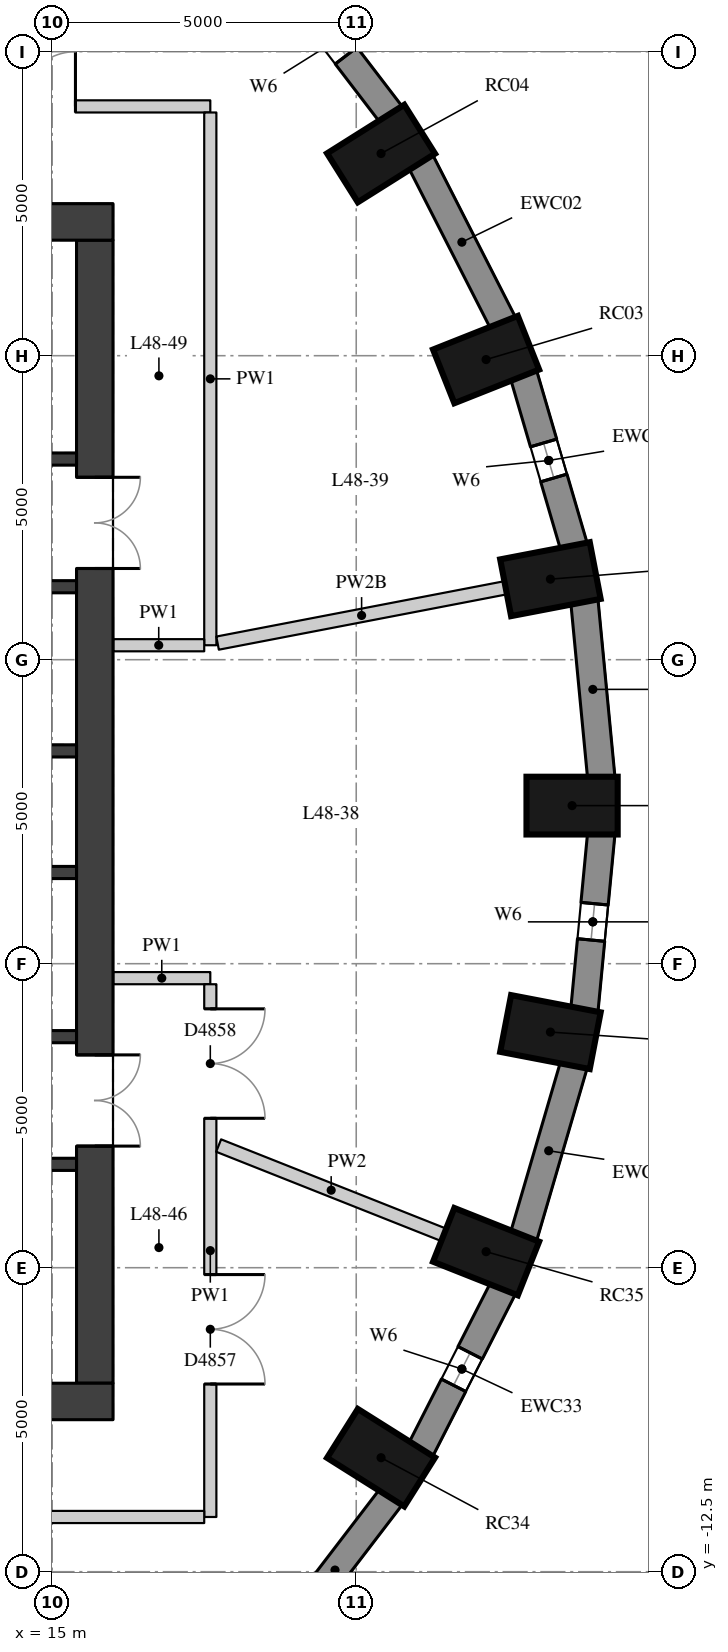
"""IFC4 building model, lengths in metres.
Left out: names, types, materials, properties, quantities, classifications, styles, units other than length and angle.
Written with IfcOpenShell. Run it as: python <this file> out.ifc"""

import sys

from ifc_helpers import new_model, si_unit, direction, frame, frame_2d, origin, origin_2d, place, context, subcontext, project, spatial, rectangle, extrude, element, fill, save


model = new_model("IFC4")
c1 = context("Model", 3, precision=1e-05, world=origin(), true_north=direction((0.0, 1.0)))
c2 = subcontext(c1, "Body", "Model", "MODEL_VIEW")
j1 = project(units=[si_unit("LENGTHUNIT", "METRE"), si_unit("PLANEANGLEUNIT", "RADIAN")], contexts=[c1])
p1 = place(None, origin())
s1 = spatial("IfcSite", under=j1, at=p1, CompositionType="ELEMENT")
p2 = place(p1, origin())
s2 = spatial("IfcBuilding", under=s1, at=p2, CompositionType="ELEMENT")
p3 = place(p2, frame((0.0, 0.0, 171.5)))
s3 = spatial("IfcBuildingStorey", under=s2, at=p3, CompositionType="ELEMENT", Elevation=171.5)
for number, where, z_axis, x_axis in (
    (1, (23.55, 0.1, 0.0), (0.0, 0.0, 1.0), (1.0, 0.0, 0.0)),
    (2, (23.194, 3.825, 0.0), (0.0, 0.0, 1.0), (0.982, 0.189, 0.0)),
    (3, (22.136, 7.436, 0.0), (0.0, 0.0, 1.0), (0.93, 0.369, 0.0)),
    (4, (20.408, 10.825, 0.0), (0.0, 0.0, 1.0), (0.846, 0.533, 0.0)),
    (5, (20.408, -10.625, 0.0), (0.0, 0.0, 1.0), (0.846, -0.533, 0.0)),
    (6, (22.136, -7.236, 0.0), (0.0, 0.0, 1.0), (0.93, -0.369, 0.0)),
    (7, (23.194, -3.625, 0.0), (0.0, 0.0, 1.0), (0.982, -0.189, 0.0)),
):
    element("IfcColumn", number, at=place(p3, frame(where, z_axis=z_axis, x_axis=x_axis)), inside=s3, PredefinedType="COLUMN", context=c2, shape_type="SweptSolid", body=[
        extrude(rectangle(XDim=1.5, YDim=0.95, at=origin_2d()), origin(), (0.0, 0.0, 1.0), 3.3),
    ])
p4 = place(p3, frame((24.031, 0.555, 0.0), z_axis=(0.0, 0.0, 1.0), x_axis=(-0.095265737322, 0.995451876935, 0.0)))
e8 = element("IfcWall", 8, at=p4, inside=s3, PredefinedType="SOLIDWALL", context=c2, shape_type="SweptSolid", body=[
    extrude(rectangle(XDim=2.927, YDim=0.45, at=frame_2d((1.463, 0.0))), origin(), (0.0, 0.0, 1.0), 3.02),
])
p5 = place(p3, frame((23.58, 4.362, 0.0), z_axis=(0.0, 0.0, 1.0), x_axis=(-0.281049481624, 0.959693278542, 0.0)))
e9 = element("IfcWall", 9, at=p5, inside=s3, PredefinedType="SOLIDWALL", context=c2, shape_type="SweptSolid", body=[
    extrude(rectangle(XDim=2.948, YDim=0.45, at=frame_2d((1.474, 0.0))), origin(), (0.0, 0.0, 1.0), 3.02),
])
p6 = place(p5, frame((1.174, 0.0, 0.4)))
e10 = element("IfcOpeningElement", 10, at=p6, cuts=e9, PredefinedType="OPENING", context=c2, shape_type="SweptSolid", body=[
    extrude(rectangle(XDim=0.6, YDim=1.75, at=frame_2d((0.3, 0.875))), frame((0.0, 0.235, 0.0), z_axis=(0.0, -1.0, 0.0), x_axis=(1.0, 0.0, 0.0)), (0.0, 0.0, 1.0), 0.47),
])
p7 = place(p3, frame((22.415, 8.037, 0.0), z_axis=(0.0, 0.0, 1.0), x_axis=(-0.454133999889, 0.890933392653, 0.0)))
e11 = element("IfcWall", 11, at=p7, inside=s3, PredefinedType="SOLIDWALL", context=c2, shape_type="SweptSolid", body=[
    extrude(rectangle(XDim=2.986, YDim=0.45, at=frame_2d((1.493, 0.0))), origin(), (0.0, 0.0, 1.0), 3.02),
])
p8 = place(p3, frame((20.574, 11.467, 0.0), z_axis=(0.0, 0.0, 1.0), x_axis=(-0.607817056371, 0.794077090706, 0.0)))
e12 = element("IfcWall", 12, at=p8, inside=s3, PredefinedType="SOLIDWALL", context=c2, shape_type="SweptSolid", body=[
    extrude(rectangle(XDim=3.037, YDim=0.45, at=frame_2d((1.519, 0.0))), origin(), (0.0, 0.0, 1.0), 3.02),
])
p9 = place(p8, frame((1.219, 0.0, 0.4)))
e13 = element("IfcOpeningElement", 13, at=p9, cuts=e12, PredefinedType="OPENING", context=c2, shape_type="SweptSolid", body=[
    extrude(rectangle(XDim=0.6, YDim=1.75, at=frame_2d((0.3, 0.875))), frame((0.0, 0.235, 0.0), z_axis=(0.0, -1.0, 0.0), x_axis=(1.0, 0.0, 0.0)), (0.0, 0.0, 1.0), 0.47),
])
p10 = place(p3, frame((18.728, -13.679, 0.0), z_axis=(0.0, 0.0, 1.0), x_axis=(0.607817056371, 0.794077090706, 0.0)))
e14 = element("IfcWall", 14, at=p10, inside=s3, PredefinedType="SOLIDWALL", context=c2, shape_type="SweptSolid", body=[
    extrude(rectangle(XDim=3.037, YDim=0.45, at=frame_2d((1.519, 0.0))), origin(), (0.0, 0.0, 1.0), 3.02),
])
p11 = place(p3, frame((21.059, -10.497, 0.0), z_axis=(0.0, 0.0, 1.0), x_axis=(0.454133999889, 0.890933392653, 0.0)))
e15 = element("IfcWall", 15, at=p11, inside=s3, PredefinedType="SOLIDWALL", context=c2, shape_type="SweptSolid", body=[
    extrude(rectangle(XDim=2.986, YDim=0.45, at=frame_2d((1.493, 0.0))), origin(), (0.0, 0.0, 1.0), 3.02),
])
p12 = place(p11, frame((1.193, 0.0, 0.4)))
e16 = element("IfcOpeningElement", 16, at=p12, cuts=e15, PredefinedType="OPENING", context=c2, shape_type="SweptSolid", body=[
    extrude(rectangle(XDim=0.6, YDim=1.75, at=frame_2d((0.3, 0.875))), frame((0.0, 0.235, 0.0), z_axis=(0.0, -1.0, 0.0), x_axis=(1.0, 0.0, 0.0)), (0.0, 0.0, 1.0), 0.47),
])
p13 = place(p3, frame((22.751, -6.991, 0.0), z_axis=(0.0, 0.0, 1.0), x_axis=(0.281049481624, 0.959693278542, 0.0)))
e17 = element("IfcWall", 17, at=p13, inside=s3, PredefinedType="SOLIDWALL", context=c2, shape_type="SweptSolid", body=[
    extrude(rectangle(XDim=2.948, YDim=0.45, at=frame_2d((1.474, 0.0))), origin(), (0.0, 0.0, 1.0), 3.02),
])
p14 = place(p3, frame((23.752, -3.269, 0.0), z_axis=(0.0, 0.0, 1.0), x_axis=(0.095257827044, 0.995452633924, 0.0)))
e18 = element("IfcWall", 18, at=p14, inside=s3, PredefinedType="SOLIDWALL", context=c2, shape_type="SweptSolid", body=[
    extrude(rectangle(XDim=2.927, YDim=0.45, at=frame_2d((1.463, 0.0))), origin(), (0.0, 0.0, 1.0), 3.02),
])
p15 = place(p14, frame((1.163, 0.0, 0.4)))
e19 = element("IfcOpeningElement", 19, at=p15, cuts=e18, PredefinedType="OPENING", context=c2, shape_type="SweptSolid", body=[
    extrude(rectangle(XDim=0.6, YDim=1.75, at=frame_2d((0.3, 0.875))), frame((0.0, 0.235, 0.0), z_axis=(0.0, -1.0, 0.0), x_axis=(1.0, 0.0, 0.0)), (0.0, 0.0, 1.0), 0.47),
])
p16 = place(p3, frame((15.7, -9.4, 0.0), z_axis=(0.0, 0.0, 1.0), x_axis=(0.0, 1.0, 0.0)))
e20 = element("IfcWall", 20, at=p16, inside=s3, PredefinedType="SHEAR", context=c2, shape_type="SweptSolid", body=[
    extrude(rectangle(XDim=18.8, YDim=0.6, at=frame_2d((9.4, 0.0))), origin(), (0.0, 0.0, 1.0), 3.02),
])
p17 = place(p16, frame((13.4, 0.0, 0.0)))
e21 = element("IfcOpeningElement", 21, at=p17, cuts=e20, PredefinedType="OPENING", context=c2, shape_type="SweptSolid", body=[
    extrude(rectangle(XDim=1.5, YDim=2.1, at=frame_2d((0.75, 1.05))), frame((0.0, 0.31, 0.0), z_axis=(0.0, -1.0, 0.0), x_axis=(1.0, 0.0, 0.0)), (0.0, 0.0, 1.0), 0.62),
])
p18 = place(p16, frame((3.9, 0.0, 0.0)))
e22 = element("IfcOpeningElement", 22, at=p18, cuts=e20, PredefinedType="OPENING", context=c2, shape_type="SweptSolid", body=[
    extrude(rectangle(XDim=1.5, YDim=2.1, at=frame_2d((0.75, 1.05))), frame((0.0, 0.31, 0.0), z_axis=(0.0, -1.0, 0.0), x_axis=(1.0, 0.0, 0.0)), (0.0, 0.0, 1.0), 0.62),
])
for number, where, z_axis, x_axis in (
    (23, (4.0, 9.7, 0.0), (0.0, 0.0, 1.0), (1.0, 0.0, 0.0)),
    (24, (4.0, -9.7, 0.0), (0.0, 0.0, 1.0), (1.0, 0.0, 0.0)),
):
    element("IfcWall", number, at=place(p3, frame(where, z_axis=z_axis, x_axis=x_axis)), inside=s3, PredefinedType="SHEAR", context=c2, shape_type="SweptSolid", body=[
        extrude(rectangle(XDim=12.0, YDim=0.6, at=frame_2d((6.0, 0.0))), origin(), (0.0, 0.0, 1.0), 3.02),
    ])
p19 = place(p3, frame((4.6, 5.8, 0.0), z_axis=(0.0, 0.0, 1.0), x_axis=(1.0, 0.0, 0.0)))
e25 = element("IfcWall", 25, at=p19, inside=s3, PredefinedType="SHEAR", context=c2, shape_type="SweptSolid", body=[
    extrude(rectangle(XDim=10.8, YDim=0.2, at=frame_2d((5.4, 0.0))), origin(), (0.0, 0.0, 1.0), 3.02),
])
p20 = place(p19, frame((7.05, 0.0, 0.0)))
e26 = element("IfcOpeningElement", 26, at=p20, cuts=e25, PredefinedType="OPENING", context=c2, shape_type="SweptSolid", body=[
    extrude(rectangle(XDim=1.1, YDim=2.1, at=frame_2d((0.55, 1.05))), frame((0.0, 0.11, 0.0), z_axis=(0.0, -1.0, 0.0), x_axis=(1.0, 0.0, 0.0)), (0.0, 0.0, 1.0), 0.22),
])
p21 = place(p19, frame((9.05, 0.0, 0.0)))
e27 = element("IfcOpeningElement", 27, at=p21, cuts=e25, PredefinedType="OPENING", context=c2, shape_type="SweptSolid", body=[
    extrude(rectangle(XDim=1.1, YDim=2.1, at=frame_2d((0.55, 1.05))), frame((0.0, 0.11, 0.0), z_axis=(0.0, -1.0, 0.0), x_axis=(1.0, 0.0, 0.0)), (0.0, 0.0, 1.0), 0.22),
])
p22 = place(p3, frame((4.6, 3.7, 0.0), z_axis=(0.0, 0.0, 1.0), x_axis=(1.0, 0.0, 0.0)))
e28 = element("IfcWall", 28, at=p22, inside=s3, PredefinedType="SHEAR", context=c2, shape_type="SweptSolid", body=[
    extrude(rectangle(XDim=10.8, YDim=0.2, at=frame_2d((5.4, 0.0))), origin(), (0.0, 0.0, 1.0), 3.02),
])
p23 = place(p22, frame((6.6, 0.0, 0.0)))
e29 = element("IfcOpeningElement", 29, at=p23, cuts=e28, PredefinedType="OPENING", context=c2, shape_type="SweptSolid", body=[
    extrude(rectangle(XDim=1.1, YDim=2.1, at=frame_2d((0.55, 1.05))), frame((0.0, 0.11, 0.0), z_axis=(0.0, -1.0, 0.0), x_axis=(1.0, 0.0, 0.0)), (0.0, 0.0, 1.0), 0.22),
])
p24 = place(p22, frame((8.9, 0.0, 0.0)))
e30 = element("IfcOpeningElement", 30, at=p24, cuts=e28, PredefinedType="OPENING", context=c2, shape_type="SweptSolid", body=[
    extrude(rectangle(XDim=1.1, YDim=2.1, at=frame_2d((0.55, 1.05))), frame((0.0, 0.11, 0.0), z_axis=(0.0, -1.0, 0.0), x_axis=(1.0, 0.0, 0.0)), (0.0, 0.0, 1.0), 0.22),
])
for number, where, z_axis, x_axis in (
    (31, (4.6, 1.0, 0.0), (0.0, 0.0, 1.0), (1.0, 0.0, 0.0)),
    (32, (4.6, -1.0, 0.0), (0.0, 0.0, 1.0), (1.0, 0.0, 0.0)),
):
    element("IfcWall", number, at=place(p3, frame(where, z_axis=z_axis, x_axis=x_axis)), inside=s3, PredefinedType="SHEAR", context=c2, shape_type="SweptSolid", body=[
        extrude(rectangle(XDim=10.8, YDim=0.2, at=frame_2d((5.4, 0.0))), origin(), (0.0, 0.0, 1.0), 3.02),
    ])
p25 = place(p3, frame((4.6, -3.7, 0.0), z_axis=(0.0, 0.0, 1.0), x_axis=(1.0, 0.0, 0.0)))
e33 = element("IfcWall", 33, at=p25, inside=s3, PredefinedType="SHEAR", context=c2, shape_type="SweptSolid", body=[
    extrude(rectangle(XDim=10.8, YDim=0.2, at=frame_2d((5.4, 0.0))), origin(), (0.0, 0.0, 1.0), 3.02),
])
p26 = place(p25, frame((6.6, 0.0, 0.0)))
e34 = element("IfcOpeningElement", 34, at=p26, cuts=e33, PredefinedType="OPENING", context=c2, shape_type="SweptSolid", body=[
    extrude(rectangle(XDim=1.1, YDim=2.1, at=frame_2d((0.55, 1.05))), frame((0.0, 0.11, 0.0), z_axis=(0.0, -1.0, 0.0), x_axis=(1.0, 0.0, 0.0)), (0.0, 0.0, 1.0), 0.22),
])
p27 = place(p25, frame((8.9, 0.0, 0.0)))
e35 = element("IfcOpeningElement", 35, at=p27, cuts=e33, PredefinedType="OPENING", context=c2, shape_type="SweptSolid", body=[
    extrude(rectangle(XDim=1.1, YDim=2.1, at=frame_2d((0.55, 1.05))), frame((0.0, 0.11, 0.0), z_axis=(0.0, -1.0, 0.0), x_axis=(1.0, 0.0, 0.0)), (0.0, 0.0, 1.0), 0.22),
])
p28 = place(p3, frame((4.6, -5.8, 0.0), z_axis=(0.0, 0.0, 1.0), x_axis=(1.0, 0.0, 0.0)))
e36 = element("IfcWall", 36, at=p28, inside=s3, PredefinedType="SHEAR", context=c2, shape_type="SweptSolid", body=[
    extrude(rectangle(XDim=10.8, YDim=0.2, at=frame_2d((5.4, 0.0))), origin(), (0.0, 0.0, 1.0), 3.02),
])
p29 = place(p3, frame((8.817, 11.6, 0.0), z_axis=(0.0, 0.0, 1.0), x_axis=(1.0, 0.0, 0.0)))
e37 = element("IfcWall", 37, at=p29, inside=s3, PredefinedType="PARTITIONING", context=c2, shape_type="SweptSolid", body=[
    extrude(rectangle(XDim=8.783, YDim=0.2, at=frame_2d((4.392, 0.0))), origin(), (0.0, 0.0, 1.0), 3.02),
])
p30 = place(p29, frame((0.14, 0.0, 0.0)))
e38 = element("IfcOpeningElement", 38, at=p30, cuts=e37, PredefinedType="OPENING", context=c2, shape_type="SweptSolid", body=[
    extrude(rectangle(XDim=1.1, YDim=2.1, at=frame_2d((0.55, 1.05))), frame((0.0, 0.11, 0.0), z_axis=(0.0, -1.0, 0.0), x_axis=(1.0, 0.0, 0.0)), (0.0, 0.0, 1.0), 0.22),
])
p31 = place(p29, frame((4.766, 0.0, 0.0)))
e39 = element("IfcOpeningElement", 39, at=p31, cuts=e37, PredefinedType="OPENING", context=c2, shape_type="SweptSolid", body=[
    extrude(rectangle(XDim=1.8, YDim=2.1, at=frame_2d((0.9, 1.05))), frame((0.0, 0.11, 0.0), z_axis=(0.0, -1.0, 0.0), x_axis=(1.0, 0.0, 0.0)), (0.0, 0.0, 1.0), 0.22),
])
p32 = place(p3, frame((17.6, 11.5, 0.0), z_axis=(0.0, 0.0, 1.0), x_axis=(0.0, -1.0, 0.0)))
e40 = element("IfcWall", 40, at=p32, inside=s3, PredefinedType="PARTITIONING", context=c2, shape_type="SweptSolid", body=[
    extrude(rectangle(XDim=8.762, YDim=0.2, at=frame_2d((4.381, 0.0))), origin(), (0.0, 0.0, 1.0), 3.02),
])
p33 = place(p3, frame((17.5, 2.738, 0.0), z_axis=(0.0, 0.0, 1.0), x_axis=(-1.0, 0.0, 0.0)))
e41 = element("IfcWall", 41, at=p33, inside=s3, PredefinedType="PARTITIONING", context=c2, shape_type="SweptSolid", body=[
    extrude(rectangle(XDim=1.496, YDim=0.2, at=frame_2d((0.748, 0.0))), origin(), (0.0, 0.0, 1.0), 3.02),
])
p34 = place(p3, frame((16.004, -2.738, 0.0), z_axis=(0.0, 0.0, 1.0), x_axis=(1.0, 0.0, 0.0)))
e42 = element("IfcWall", 42, at=p34, inside=s3, PredefinedType="PARTITIONING", context=c2, shape_type="SweptSolid", body=[
    extrude(rectangle(XDim=1.596, YDim=0.2, at=frame_2d((0.798, 0.0))), origin(), (0.0, 0.0, 1.0), 3.02),
])
p35 = place(p3, frame((17.6, -2.838, 0.0), z_axis=(0.0, 0.0, 1.0), x_axis=(0.0, -1.0, 0.0)))
e43 = element("IfcWall", 43, at=p35, inside=s3, PredefinedType="PARTITIONING", context=c2, shape_type="SweptSolid", body=[
    extrude(rectangle(XDim=8.762, YDim=0.2, at=frame_2d((4.381, 0.0))), origin(), (0.0, 0.0, 1.0), 3.02),
])
p36 = place(p35, frame((4.775, 0.0, 0.0)))
e44 = element("IfcOpeningElement", 44, at=p36, cuts=e43, PredefinedType="OPENING", context=c2, shape_type="SweptSolid", body=[
    extrude(rectangle(XDim=1.8, YDim=2.1, at=frame_2d((0.9, 1.05))), frame((0.0, 0.11, 0.0), z_axis=(0.0, -1.0, 0.0), x_axis=(1.0, 0.0, 0.0)), (0.0, 0.0, 1.0), 0.22),
])
p37 = place(p35, frame((0.405, 0.0, 0.0)))
e45 = element("IfcOpeningElement", 45, at=p37, cuts=e43, PredefinedType="OPENING", context=c2, shape_type="SweptSolid", body=[
    extrude(rectangle(XDim=1.8, YDim=2.1, at=frame_2d((0.9, 1.05))), frame((0.0, 0.11, 0.0), z_axis=(0.0, -1.0, 0.0), x_axis=(1.0, 0.0, 0.0)), (0.0, 0.0, 1.0), 0.22),
])
p38 = place(p3, frame((17.5, -11.6, 0.0), z_axis=(0.0, 0.0, 1.0), x_axis=(-1.0, 0.0, 0.0)))
e46 = element("IfcWall", 46, at=p38, inside=s3, PredefinedType="PARTITIONING", context=c2, shape_type="SweptSolid", body=[
    extrude(rectangle(XDim=9.647, YDim=0.2, at=frame_2d((4.823, 0.0))), origin(), (0.0, 0.0, 1.0), 3.02),
])
p39 = place(p38, frame((7.192, 0.0, 0.0)))
e47 = element("IfcOpeningElement", 47, at=p39, cuts=e46, PredefinedType="OPENING", context=c2, shape_type="SweptSolid", body=[
    extrude(rectangle(XDim=0.9, YDim=2.1, at=frame_2d((0.45, 1.05))), frame((0.0, 0.11, 0.0), z_axis=(0.0, -1.0, 0.0), x_axis=(1.0, 0.0, 0.0)), (0.0, 0.0, 1.0), 0.22),
])
p40 = place(p3, frame((22.457, 3.683, 0.0), z_axis=(0.0, 0.0, 1.0), x_axis=(-0.982022686577, -0.188762928159, 0.0)))
e48 = element("IfcWall", 48, at=p40, inside=s3, PredefinedType="PARTITIONING", context=c2, shape_type="SweptSolid", body=[
    extrude(rectangle(XDim=4.824, YDim=0.22, at=frame_2d((2.412, 0.0))), origin(), (0.0, 0.0, 1.0), 2.57),
])
p41 = place(p3, frame((21.439, -6.96, 0.0), z_axis=(0.0, 0.0, 1.0), x_axis=(-0.929517399972, 0.368778257426, 0.0)))
e49 = element("IfcWall", 49, at=p41, inside=s3, PredefinedType="PARTITIONING", context=c2, shape_type="SweptSolid", body=[
    extrude(rectangle(XDim=3.982, YDim=0.22, at=frame_2d((1.991, 0.0))), origin(), (0.0, 0.0, 1.0), 3.02),
])
p42 = place(p6, origin())
e50 = element("IfcWindow", 50, at=p42, inside=s3, PartitioningType="SINGLE_PANEL", PredefinedType="WINDOW", context=c2, shape_type="SweptSolid", body=[
    extrude(rectangle(XDim=0.6, YDim=1.75, at=frame_2d((0.3, 0.875))), frame((0.0, 0.035, 0.0), z_axis=(0.0, -1.0, 0.0), x_axis=(1.0, 0.0, 0.0)), (0.0, 0.0, 1.0), 0.06),
])
fill(e10, e50)
p43 = place(p9, origin())
e51 = element("IfcWindow", 51, at=p43, inside=s3, PartitioningType="SINGLE_PANEL", PredefinedType="WINDOW", context=c2, shape_type="SweptSolid", body=[
    extrude(rectangle(XDim=0.6, YDim=1.75, at=frame_2d((0.3, 0.875))), frame((0.0, 0.035, 0.0), z_axis=(0.0, -1.0, 0.0), x_axis=(1.0, 0.0, 0.0)), (0.0, 0.0, 1.0), 0.06),
])
fill(e13, e51)
p44 = place(p12, origin())
e52 = element("IfcWindow", 52, at=p44, inside=s3, PartitioningType="SINGLE_PANEL", PredefinedType="WINDOW", context=c2, shape_type="SweptSolid", body=[
    extrude(rectangle(XDim=0.6, YDim=1.75, at=frame_2d((0.3, 0.875))), frame((0.0, 0.035, 0.0), z_axis=(0.0, -1.0, 0.0), x_axis=(1.0, 0.0, 0.0)), (0.0, 0.0, 1.0), 0.06),
])
fill(e16, e52)
p45 = place(p15, origin())
e53 = element("IfcWindow", 53, at=p45, inside=s3, PartitioningType="SINGLE_PANEL", PredefinedType="WINDOW", context=c2, shape_type="SweptSolid", body=[
    extrude(rectangle(XDim=0.6, YDim=1.75, at=frame_2d((0.3, 0.875))), frame((0.0, 0.035, 0.0), z_axis=(0.0, -1.0, 0.0), x_axis=(1.0, 0.0, 0.0)), (0.0, 0.0, 1.0), 0.06),
])
fill(e19, e53)
p46 = place(p17, origin())
e54 = element("IfcDoor", 54, at=p46, inside=s3, OperationType="DOUBLE_DOOR_SINGLE_SWING", PredefinedType="DOOR", context=c2, shape_type="SweptSolid", body=[
    extrude(rectangle(XDim=1.5, YDim=2.1, at=frame_2d((0.75, 1.05))), frame((0.0, 0.025, 0.0), z_axis=(0.0, -1.0, 0.0), x_axis=(1.0, 0.0, 0.0)), (0.0, 0.0, 1.0), 0.05),
])
fill(e21, e54)
p47 = place(p18, origin())
e55 = element("IfcDoor", 55, at=p47, inside=s3, OperationType="DOUBLE_DOOR_SINGLE_SWING", PredefinedType="DOOR", context=c2, shape_type="SweptSolid", body=[
    extrude(rectangle(XDim=1.5, YDim=2.1, at=frame_2d((0.75, 1.05))), frame((0.0, 0.025, 0.0), z_axis=(0.0, -1.0, 0.0), x_axis=(1.0, 0.0, 0.0)), (0.0, 0.0, 1.0), 0.05),
])
fill(e22, e55)
p48 = place(p36, origin())
e56 = element("IfcDoor", 56, at=p48, inside=s3, OperationType="DOUBLE_DOOR_SINGLE_SWING", PredefinedType="DOOR", context=c2, shape_type="SweptSolid", body=[
    extrude(rectangle(XDim=1.8, YDim=2.1, at=frame_2d((0.9, 1.05))), frame((0.0, 0.025, 0.0), z_axis=(0.0, -1.0, 0.0), x_axis=(1.0, 0.0, 0.0)), (0.0, 0.0, 1.0), 0.05),
])
fill(e44, e56)
p49 = place(p37, origin())
e57 = element("IfcDoor", 57, at=p49, inside=s3, OperationType="DOUBLE_DOOR_SINGLE_SWING", PredefinedType="DOOR", context=c2, shape_type="SweptSolid", body=[
    extrude(rectangle(XDim=1.8, YDim=2.1, at=frame_2d((0.9, 1.05))), frame((0.0, 0.025, 0.0), z_axis=(0.0, -1.0, 0.0), x_axis=(1.0, 0.0, 0.0)), (0.0, 0.0, 1.0), 0.05),
])
fill(e45, e57)
p50 = place(p31, origin())
e58 = element("IfcDoor", 58, at=p50, inside=s3, OperationType="DOUBLE_DOOR_SINGLE_SWING", PredefinedType="DOOR", context=c2, shape_type="SweptSolid", body=[
    extrude(rectangle(XDim=1.8, YDim=2.1, at=frame_2d((0.9, 1.05))), frame((0.0, 0.025, 0.0), z_axis=(0.0, -1.0, 0.0), x_axis=(1.0, 0.0, 0.0)), (0.0, 0.0, 1.0), 0.05),
])
fill(e39, e58)
save(model, sys.argv[1])
